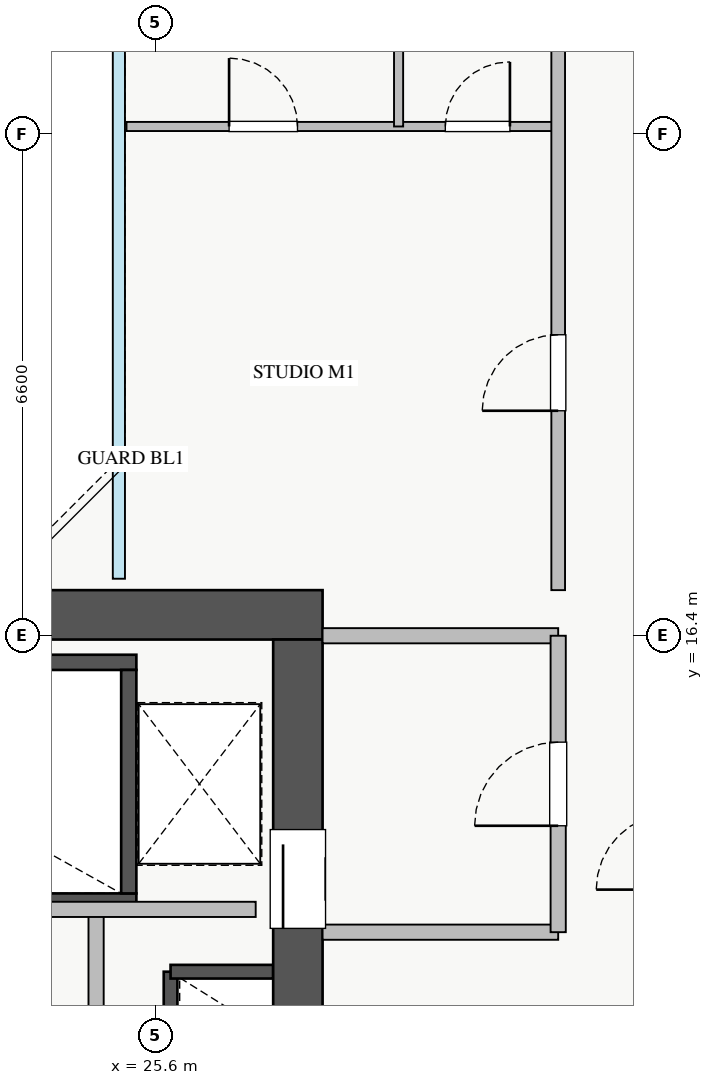
"""IFC4 building model, lengths in metres.
Left out: names, types, materials, properties, quantities, classifications, styles, units other than length and angle.
Written with IfcOpenShell. Run it as: python <this file> out.ifc"""

import sys

from ifc_helpers import new_model, si_unit, direction, frame, frame_2d, origin, place, context, subcontext, project, spatial, rectangle, extrude, source, transform, mapped, element, fill, save


model = new_model("IFC4")
c1 = context("Model", 3, precision=1e-05, world=origin(), true_north=direction((0.0, 1.0)))
c2 = subcontext(c1, "Body", "Model", "MODEL_VIEW")
j1 = project(units=[si_unit("LENGTHUNIT", "METRE"), si_unit("PLANEANGLEUNIT", "RADIAN")], contexts=[c1])
p1 = place(None, origin())
s1 = spatial("IfcSite", under=j1, at=p1, CompositionType="ELEMENT")
p2 = place(p1, origin())
s2 = spatial("IfcBuilding", under=s1, at=p2, CompositionType="ELEMENT")
p3 = place(p2, frame((0.0, 0.0, 136.0)))
s3 = spatial("IfcBuildingStorey", under=s2, at=p3, CompositionType="ELEMENT", Elevation=136.0)
p4 = place(p3, frame((25.8, 10.92, 0.0), z_axis=(0.0, 0.0, 1.0), x_axis=(0.0, 1.0, 0.0)))
e1 = element("IfcWall", 1, at=p4, inside=s3, PredefinedType="SHEAR", context=c2, shape_type="SweptSolid", body=[
    extrude(rectangle(XDim=1.06, YDim=0.18, at=frame_2d((0.53, 0.0))), origin(), (0.0, 0.0, 1.0), 3.03),
])
p5 = place(p3, frame((25.8, 11.98, 0.0), z_axis=(0.0, 0.0, 1.0), x_axis=(1.0, 0.0, 0.0)))
e2 = element("IfcWall", 2, at=p5, inside=s3, PredefinedType="SHEAR", context=c2, shape_type="SweptSolid", body=[
    extrude(rectangle(XDim=1.35, YDim=0.18, at=frame_2d((0.675, 0.0))), origin(), (0.0, 0.0, 1.0), 3.03),
])
p6 = place(p3, frame((18.2, 12.91, 0.0), z_axis=(0.0, 0.0, 1.0), x_axis=(1.0, 0.0, 0.0)))
e3 = element("IfcWall", 3, at=p6, inside=s3, PredefinedType="SHEAR", context=c2, shape_type="SweptSolid", body=[
    extrude(rectangle(XDim=7.15, YDim=0.2, at=frame_2d((3.575, 0.0))), origin(), (0.0, 0.0, 1.0), 3.25),
])
p7 = place(p6, frame((0.35, 0.0, 0.0)))
e4 = element("IfcOpeningElement", 4, at=p7, cuts=e3, PredefinedType="OPENING", context=c2, shape_type="SweptSolid", body=[
    extrude(rectangle(XDim=1.1, YDim=2.05, at=frame_2d((0.55, 1.025))), frame((0.0, 0.11, 0.0), z_axis=(0.0, -1.0, 0.0), x_axis=(1.0, 0.0, 0.0)), (0.0, 0.0, 1.0), 0.22),
])
p8 = place(p3, frame((18.2, 16.05, 0.0), z_axis=(0.0, 0.0, 1.0), x_axis=(1.0, 0.0, 0.0)))
e5 = element("IfcWall", 5, at=p8, inside=s3, PredefinedType="SHEAR", context=c2, shape_type="SweptSolid", body=[
    extrude(rectangle(XDim=7.15, YDim=0.2, at=frame_2d((3.575, 0.0))), origin(), (0.0, 0.0, 1.0), 3.25),
])
p9 = place(p3, frame((25.25, 13.01, 0.0), z_axis=(0.0, 0.0, 1.0), x_axis=(0.0, 1.0, 0.0)))
e6 = element("IfcWall", 6, at=p9, inside=s3, PredefinedType="SHEAR", context=c2, shape_type="SweptSolid", body=[
    extrude(rectangle(XDim=2.94, YDim=0.2, at=frame_2d((1.47, 0.0))), origin(), (0.0, 0.0, 1.0), 3.25),
])
p10 = place(p3, frame((10.2, 16.675, 0.0), z_axis=(0.0, 0.0, 1.0), x_axis=(1.0, 0.0, 0.0)))
e7 = element("IfcWall", 7, at=p10, inside=s3, PredefinedType="SHEAR", context=c2, shape_type="SweptSolid", body=[
    extrude(rectangle(XDim=17.6, YDim=0.65, at=frame_2d((8.8, 0.0))), origin(), (0.0, 0.0, 1.0), 3.25),
])
p11 = place(p3, frame((27.475, 10.45, 0.0), z_axis=(0.0, 0.0, 1.0), x_axis=(0.0, 1.0, 0.0)))
e8 = element("IfcWall", 8, at=p11, inside=s3, PredefinedType="SHEAR", context=c2, shape_type="SweptSolid", body=[
    extrude(rectangle(XDim=5.9, YDim=0.65, at=frame_2d((2.95, 0.0))), origin(), (0.0, 0.0, 1.0), 3.25),
])
p12 = place(p11, frame((2.1, 0.0, 0.0)))
e9 = element("IfcOpeningElement", 9, at=p12, cuts=e8, PredefinedType="OPENING", context=c2, shape_type="SweptSolid", body=[
    extrude(rectangle(XDim=1.3, YDim=2.05, at=frame_2d((0.65, 1.025))), frame((0.0, 0.335, 0.0), z_axis=(0.0, -1.0, 0.0), x_axis=(1.0, 0.0, 0.0)), (0.0, 0.0, 1.0), 0.67),
])
for number, where, z_axis, x_axis in (
    (10, (27.8, 16.4, 0.0), (0.0, 0.0, 1.0), (1.0, 0.0, 0.0)),
    (11, (27.8, 12.5, 0.0), (0.0, 0.0, 1.0), (1.0, 0.0, 0.0)),
):
    element("IfcWall", number, at=place(p3, frame(where, z_axis=z_axis, x_axis=x_axis)), inside=s3, PredefinedType="PARTITIONING", context=c2, shape_type="SweptSolid", body=[
        extrude(rectangle(XDim=3.1, YDim=0.2, at=frame_2d((1.55, 0.0))), origin(), (0.0, 0.0, 1.0), 3.03),
    ])
p13 = place(p3, frame((30.9, 12.5, 0.0), z_axis=(0.0, 0.0, 1.0), x_axis=(0.0, 1.0, 0.0)))
e12 = element("IfcWall", 12, at=p13, inside=s3, PredefinedType="PARTITIONING", context=c2, shape_type="SweptSolid", body=[
    extrude(rectangle(XDim=3.9, YDim=0.2, at=frame_2d((1.95, 0.0))), origin(), (0.0, 0.0, 1.0), 3.03),
])
p14 = place(p13, frame((1.4, 0.0, 0.0)))
e13 = element("IfcOpeningElement", 13, at=p14, cuts=e12, PredefinedType="OPENING", context=c2, shape_type="SweptSolid", body=[
    extrude(rectangle(XDim=1.1, YDim=2.05, at=frame_2d((0.55, 1.025))), frame((0.0, 0.11, 0.0), z_axis=(0.0, -1.0, 0.0), x_axis=(1.0, 0.0, 0.0)), (0.0, 0.0, 1.0), 0.22),
])
p15 = place(p3, frame((24.82, 10.15, 0.0), z_axis=(0.0, 0.0, 1.0), x_axis=(0.0, 1.0, 0.0)))
e14 = element("IfcWall", 14, at=p15, inside=s3, PredefinedType="PARTITIONING", context=c2, shape_type="SweptSolid", body=[
    extrude(rectangle(XDim=2.65, YDim=0.2, at=frame_2d((1.325, 0.0))), origin(), (0.0, 0.0, 1.0), 3.03),
])
p16 = place(p3, frame((21.75, 12.8, 0.0), z_axis=(0.0, 0.0, 1.0), x_axis=(1.0, 0.0, 0.0)))
e15 = element("IfcWall", 15, at=p16, inside=s3, PredefinedType="PARTITIONING", context=c2, shape_type="SweptSolid", body=[
    extrude(rectangle(XDim=5.17, YDim=0.2, at=frame_2d((2.585, 0.0))), origin(), (0.0, 0.0, 1.0), 3.03),
])
p17 = place(p3, frame((25.22, 23.1, 0.0), z_axis=(0.0, 0.0, 1.0), x_axis=(1.0, 0.0, 0.0)))
e16 = element("IfcWall", 16, at=p17, inside=s3, PredefinedType="PLUMBINGWALL", context=c2, shape_type="SweptSolid", body=[
    extrude(rectangle(XDim=5.68, YDim=0.12, at=frame_2d((2.84, 0.0))), origin(), (0.0, 0.0, 1.0), 3.03),
])
p18 = place(p17, frame((1.35, 0.0, 0.0)))
e17 = element("IfcOpeningElement", 17, at=p18, cuts=e16, PredefinedType="OPENING", context=c2, shape_type="SweptSolid", body=[
    extrude(rectangle(XDim=0.9, YDim=2.05, at=frame_2d((0.45, 1.025))), frame((0.0, 0.07, 0.0), z_axis=(0.0, -1.0, 0.0), x_axis=(1.0, 0.0, 0.0)), (0.0, 0.0, 1.0), 0.14),
])
p19 = place(p17, frame((4.195, 0.0, 0.0)))
e18 = element("IfcOpeningElement", 18, at=p19, cuts=e16, PredefinedType="OPENING", context=c2, shape_type="SweptSolid", body=[
    extrude(rectangle(XDim=0.85, YDim=2.05, at=frame_2d((0.425, 1.025))), frame((0.0, 0.07, 0.0), z_axis=(0.0, -1.0, 0.0), x_axis=(1.0, 0.0, 0.0)), (0.0, 0.0, 1.0), 0.14),
])
p20 = place(p3, frame((28.8, 23.1, 0.0), z_axis=(0.0, 0.0, 1.0), x_axis=(0.0, 1.0, 0.0)))
e19 = element("IfcWall", 19, at=p20, inside=s3, PredefinedType="PLUMBINGWALL", context=c2, shape_type="SweptSolid", body=[
    extrude(rectangle(XDim=5.9, YDim=0.12, at=frame_2d((2.95, 0.0))), origin(), (0.0, 0.0, 1.0), 3.03),
])
p21 = place(p3, frame((30.9, 17.0, 0.0), z_axis=(0.0, 0.0, 1.0), x_axis=(0.0, 1.0, 0.0)))
e20 = element("IfcWall", 20, at=p21, inside=s3, PredefinedType="PARTITIONING", context=c2, shape_type="SweptSolid", body=[
    extrude(rectangle(XDim=12.0, YDim=0.18, at=frame_2d((6.0, 0.0))), origin(), (0.0, 0.0, 1.0), 3.03),
])
p22 = place(p21, frame((2.36, 0.0, 0.0)))
e21 = element("IfcOpeningElement", 21, at=p22, cuts=e20, PredefinedType="OPENING", context=c2, shape_type="SweptSolid", body=[
    extrude(rectangle(XDim=1.0, YDim=2.05, at=frame_2d((0.5, 1.025))), frame((0.0, 0.1, 0.0), z_axis=(0.0, -1.0, 0.0), x_axis=(1.0, 0.0, 0.0)), (0.0, 0.0, 1.0), 0.2),
])
m1 = source(origin(), c2, "Body", "SweptSolid", [
    extrude(rectangle(XDim=1.3, YDim=2.05, at=frame_2d((0.65, 1.025))), frame((0.0, 0.025, 0.0), z_axis=(0.0, -1.0, 0.0), x_axis=(1.0, 0.0, 0.0)), (0.0, 0.0, 1.0), 0.05),
])
p23 = place(p12, origin())
e22 = element("IfcDoor", 22, at=p23, inside=s3, OperationType="SLIDING_TO_RIGHT", PredefinedType="DOOR", context=c2, shape_type="MappedRepresentation", body=[
    mapped(m1, transform((0.0, 0.0, 0.0), x_axis=(1.0, 0.0, 0.0), y_axis=(0.0, 1.0, 0.0), z_axis=(0.0, 0.0, 1.0), scale=1.0)),
])
fill(e9, e22)
m2 = source(origin(), c2, "Body", "SweptSolid", [
    extrude(rectangle(XDim=1.1, YDim=2.05, at=frame_2d((0.55, 1.025))), frame((0.0, 0.025, 0.0), z_axis=(0.0, -1.0, 0.0), x_axis=(1.0, 0.0, 0.0)), (0.0, 0.0, 1.0), 0.05),
])
p24 = place(p14, origin())
e23 = element("IfcDoor", 23, at=p24, inside=s3, OperationType="SINGLE_SWING_LEFT", PredefinedType="DOOR", context=c2, shape_type="MappedRepresentation", body=[
    mapped(m2, transform((0.0, 0.0, 0.0), x_axis=(1.0, 0.0, 0.0), y_axis=(0.0, 1.0, 0.0), z_axis=(0.0, 0.0, 1.0), scale=1.0)),
])
fill(e13, e23)
m3 = source(origin(), c2, "Body", "SweptSolid", [
    extrude(rectangle(XDim=0.9, YDim=2.05, at=frame_2d((0.45, 1.025))), frame((0.0, 0.025, 0.0), z_axis=(0.0, -1.0, 0.0), x_axis=(1.0, 0.0, 0.0)), (0.0, 0.0, 1.0), 0.05),
])
p25 = place(p18, origin())
e24 = element("IfcDoor", 24, at=p25, inside=s3, OperationType="SINGLE_SWING_LEFT", PredefinedType="DOOR", context=c2, shape_type="MappedRepresentation", body=[
    mapped(m3, transform((0.0, 0.0, 0.0), x_axis=(1.0, 0.0, 0.0), y_axis=(0.0, 1.0, 0.0), z_axis=(0.0, 0.0, 1.0), scale=1.0)),
])
fill(e17, e24)
m4 = source(origin(), c2, "Body", "SweptSolid", [
    extrude(rectangle(XDim=0.85, YDim=2.05, at=frame_2d((0.425, 1.025))), frame((0.0, 0.025, 0.0), z_axis=(0.0, -1.0, 0.0), x_axis=(1.0, 0.0, 0.0)), (0.0, 0.0, 1.0), 0.05),
])
p26 = place(p19, origin())
e25 = element("IfcDoor", 25, at=p26, inside=s3, OperationType="SINGLE_SWING_RIGHT", PredefinedType="DOOR", context=c2, shape_type="MappedRepresentation", body=[
    mapped(m4, transform((0.0, 0.0, 0.0), x_axis=(1.0, 0.0, 0.0), y_axis=(0.0, 1.0, 0.0), z_axis=(0.0, 0.0, 1.0), scale=1.0)),
])
fill(e18, e25)
m5 = source(origin(), c2, "Body", "SweptSolid", [
    extrude(rectangle(XDim=1.0, YDim=2.05, at=frame_2d((0.5, 1.025))), frame((0.0, 0.025, 0.0), z_axis=(0.0, -1.0, 0.0), x_axis=(1.0, 0.0, 0.0)), (0.0, 0.0, 1.0), 0.05),
])
p27 = place(p22, origin())
e26 = element("IfcDoor", 26, at=p27, inside=s3, OperationType="SINGLE_SWING_LEFT", PredefinedType="DOOR", context=c2, shape_type="MappedRepresentation", body=[
    mapped(m5, transform((0.0, 0.0, 0.0), x_axis=(1.0, 0.0, 0.0), y_axis=(0.0, 1.0, 0.0), z_axis=(0.0, 0.0, 1.0), scale=1.0)),
])
fill(e21, e26)
save(model, sys.argv[1])
